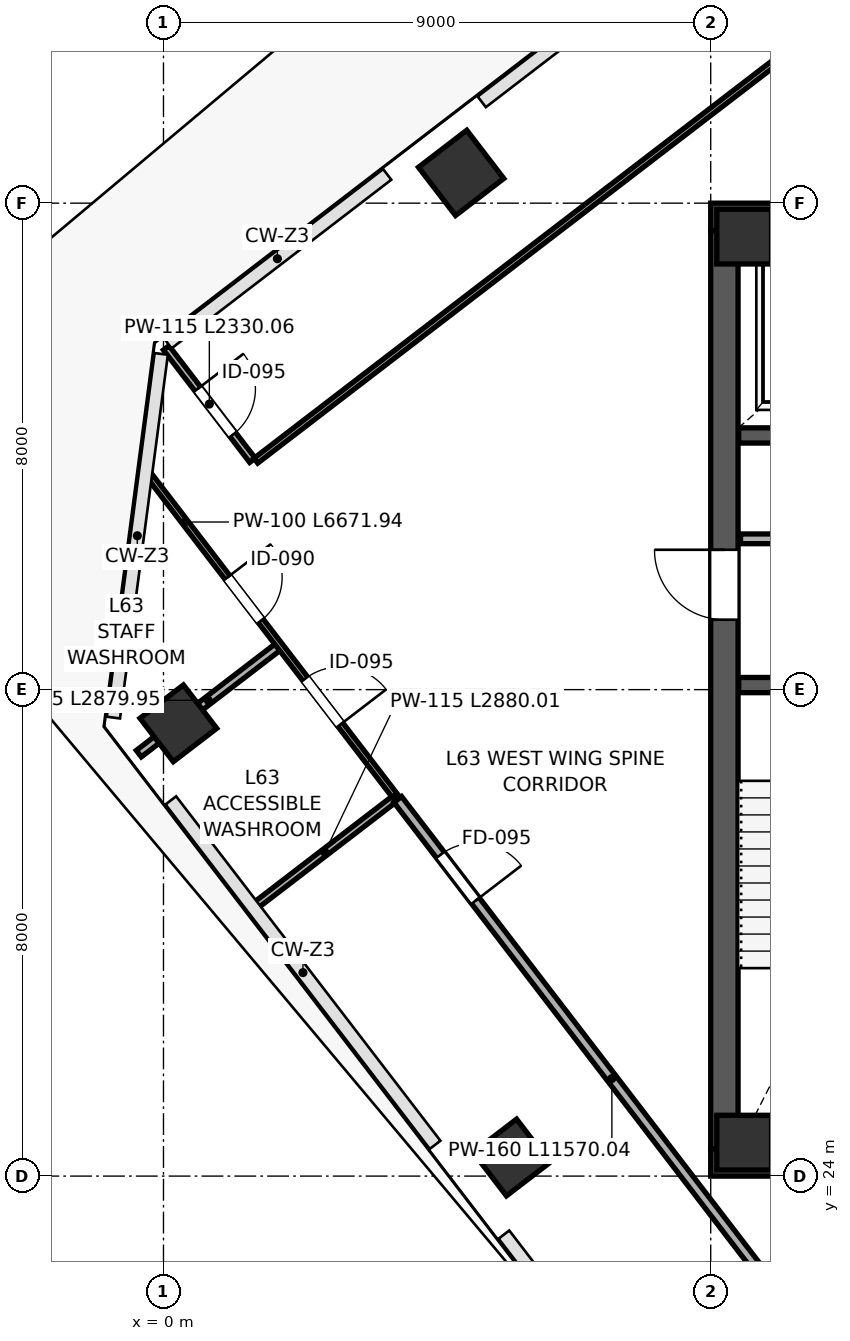
"""IFC4 building model, lengths in metres.
Left out: names, types, materials, properties, quantities, classifications, styles, units other than length and angle.
Written with IfcOpenShell. Run it as: python <this file> out.ifc"""

import sys

from ifc_helpers import new_model, si_unit, direction, frame, frame_2d, origin, origin_2d, place, context, subcontext, project, spatial, rectangle, extrude, source, transform, mapped, element, fill, save


model = new_model("IFC4")
c1 = context("Model", 3, precision=1e-05, world=origin(), true_north=direction((0.0, 1.0)))
c2 = subcontext(c1, "Body", "Model", "MODEL_VIEW")
j1 = project(units=[si_unit("LENGTHUNIT", "METRE"), si_unit("PLANEANGLEUNIT", "RADIAN")], contexts=[c1])
p1 = place(None, origin())
s1 = spatial("IfcSite", under=j1, at=p1, CompositionType="ELEMENT")
p2 = place(p1, origin())
s2 = spatial("IfcBuilding", under=s1, at=p2, CompositionType="ELEMENT")
p3 = place(p2, frame((0.0, 0.0, 279.4)))
s3 = spatial("IfcBuildingStorey", under=s2, at=p3, CompositionType="ELEMENT", Elevation=279.4)
m1 = source(origin(), c2, "Body", "SweptSolid", [
    extrude(rectangle(XDim=0.9, YDim=0.9, at=origin_2d()), origin(), (0.0, 0.0, 1.0), 4.199),
])
for number, where, z_axis, x_axis in (
    (1, (9.55, 24.55, 0.001), (0.0, 0.0, 1.0), (1.0, 0.0, 0.0)),
    (2, (9.55, 39.45, 0.001), (0.0, 0.0, 1.0), (1.0, 0.0, 0.0)),
):
    element("IfcColumn", number, at=place(p3, frame(where, z_axis=z_axis, x_axis=x_axis)), inside=s3, PredefinedType="COLUMN", context=c2, shape_type="MappedRepresentation", body=[
        mapped(m1, transform((0.0, 0.0, 0.0), scale=1.0)),
    ])
m2 = source(origin(), c2, "Body", "SweptSolid", [
    extrude(rectangle(XDim=0.9, YDim=0.9, at=origin_2d()), origin(), (0.0, 0.0, 1.0), 4.199),
])
for number, where, z_axis, x_axis in (
    (3, (0.245, 31.446, 0.001), (0.0, 0.0, 1.0), (-0.609, 0.793, 0.0)),
    (4, (5.724, 24.306, 0.001), (0.0, 0.0, 1.0), (-0.609, 0.793, 0.0)),
):
    element("IfcColumn", number, at=place(p3, frame(where, z_axis=z_axis, x_axis=x_axis)), inside=s3, PredefinedType="COLUMN", context=c2, shape_type="MappedRepresentation", body=[
        mapped(m2, transform((0.0, 0.0, 0.0), scale=1.0)),
    ])
m3 = source(origin(), c2, "Body", "SweptSolid", [
    extrude(rectangle(XDim=1.0, YDim=1.0, at=origin_2d()), origin(), (0.0, 0.0, 1.0), 4.199),
])
p4 = place(p3, frame((4.896, 40.498, 0.001), z_axis=(0.0, 0.0, 1.0), x_axis=(-0.608761429009, 0.793353340291, 0.0)))
e5 = element("IfcColumn", 5, at=p4, inside=s3, PredefinedType="COLUMN", context=c2, shape_type="MappedRepresentation", body=[
    mapped(m3, transform((0.0, 0.0, 0.0), scale=1.0)),
])
p5 = place(p3, frame((9.225, 24.45, 0.0), z_axis=(0.0, 0.0, 1.0), x_axis=(0.0, 1.0, 0.0)))
e6 = element("IfcWall", 6, at=p5, inside=s3, PredefinedType="SHEAR", context=c2, shape_type="SweptSolid", body=[
    extrude(rectangle(XDim=15.1, YDim=0.45, at=frame_2d((7.55, 0.0))), origin(), (0.0, 0.0, 1.0), 3.96),
])
p6 = place(p5, frame((8.7, 0.0, 0.0)))
e7 = element("IfcOpeningElement", 7, at=p6, cuts=e6, PredefinedType="OPENING", context=c2, shape_type="SweptSolid", body=[
    extrude(rectangle(XDim=1.15, YDim=2.2, at=frame_2d((0.575, 1.1))), frame((0.0, 0.235, 0.0), z_axis=(0.0, -1.0, 0.0), x_axis=(1.0, 0.0, 0.0)), (0.0, 0.0, 1.0), 0.47),
])
for number, where, z_axis, x_axis in (
    (8, (9.0, 24.225, 0.0), (0.0, 0.0, 1.0), (1.0, 0.0, 0.0)),
    (9, (9.0, 39.775, 0.0), (0.0, 0.0, 1.0), (1.0, 0.0, 0.0)),
):
    element("IfcWall", number, at=place(p3, frame(where, z_axis=z_axis, x_axis=x_axis)), inside=s3, PredefinedType="SHEAR", context=c2, shape_type="SweptSolid", body=[
        extrude(rectangle(XDim=18.0, YDim=0.45, at=frame_2d((9.0, 0.0))), origin(), (0.0, 0.0, 1.0), 3.96),
    ])
p7 = place(p3, frame((9.46, 32.075, 0.0), z_axis=(0.0, 0.0, 1.0), x_axis=(1.0, 0.0, 0.0)))
e10 = element("IfcWall", 10, at=p7, inside=s3, PredefinedType="SHEAR", context=c2, shape_type="SweptSolid", body=[
    extrude(rectangle(XDim=3.29, YDim=0.25, at=frame_2d((1.645, 0.0))), origin(), (0.0, 0.0, 1.0), 3.96),
])
p8 = place(p3, frame((9.46, 36.18, 0.0), z_axis=(0.0, 0.0, 1.0), x_axis=(1.0, 0.0, 0.0)))
e11 = element("IfcWall", 11, at=p8, inside=s3, PredefinedType="SHEAR", context=c2, shape_type="SweptSolid", body=[
    extrude(rectangle(XDim=3.79, YDim=0.25, at=frame_2d((1.895, 0.0))), origin(), (0.0, 0.0, 1.0), 3.96),
])
p9 = place(p8, frame((2.62, 0.0, 0.0)))
e12 = element("IfcOpeningElement", 12, at=p9, cuts=e11, PredefinedType="OPENING", context=c2, shape_type="SweptSolid", body=[
    extrude(rectangle(XDim=0.85, YDim=2.1, at=frame_2d((0.425, 1.05))), frame((0.0, 0.135, 0.0), z_axis=(0.0, -1.0, 0.0), x_axis=(1.0, 0.0, 0.0)), (0.0, 0.0, 1.0), 0.27),
])
p10 = place(p8, frame((0.85, 0.0, 0.0)))
e13 = element("IfcOpeningElement", 13, at=p10, cuts=e11, PredefinedType="OPENING", context=c2, shape_type="SweptSolid", body=[
    extrude(rectangle(XDim=1.3, YDim=2.25, at=frame_2d((0.65, 1.125))), frame((0.0, 0.135, 0.0), z_axis=(0.0, -1.0, 0.0), x_axis=(1.0, 0.0, 0.0)), (0.0, 0.0, 1.0), 0.27),
])
p11 = place(p3, frame((9.49, 34.48, 0.0), z_axis=(0.0, 0.0, 1.0), x_axis=(1.0, 0.0, 0.0)))
e14 = element("IfcWall", 14, at=p11, inside=s3, PredefinedType="PARTITIONING", context=c2, shape_type="SweptSolid", body=[
    extrude(rectangle(XDim=3.7, YDim=0.16, at=frame_2d((1.85, 0.0))), origin(), (0.0, 0.0, 1.0), 3.96),
])
p12 = place(p11, frame((1.15, 0.0, 0.0)))
e15 = element("IfcOpeningElement", 15, at=p12, cuts=e14, PredefinedType="OPENING", context=c2, shape_type="SweptSolid", body=[
    extrude(rectangle(XDim=0.9, YDim=2.15, at=frame_2d((0.45, 1.075))), frame((0.0, 0.09, 0.0), z_axis=(0.0, -1.0, 0.0), x_axis=(1.0, 0.0, 0.0)), (0.0, 0.0, 1.0), 0.18),
])
p13 = place(p3, frame((-0.406, 30.947, 0.0), z_axis=(0.0, 0.0, 1.0), x_axis=(0.793370260172, 0.608739377956, 0.0)))
e16 = element("IfcWall", 16, at=p13, inside=s3, PredefinedType="PARTITIONING", context=c2, shape_type="SweptSolid", body=[
    extrude(rectangle(XDim=2.88, YDim=0.135, at=frame_2d((1.44, 0.0))), origin(), (0.0, 0.0, 1.0), 3.195),
])
p14 = place(p3, frame((1.512, 28.448, 0.0), z_axis=(0.0, 0.0, 1.0), x_axis=(0.793370260172, 0.608739377956, 0.0)))
e17 = element("IfcWall", 17, at=p14, inside=s3, PredefinedType="PARTITIONING", context=c2, shape_type="SweptSolid", body=[
    extrude(rectangle(XDim=2.88, YDim=0.115, at=frame_2d((1.44, 0.0))), origin(), (0.0, 0.0, 1.0), 3.195),
])
p15 = place(p3, frame((-0.258, 35.551, 0.0), z_axis=(0.0, 0.0, 1.0), x_axis=(0.608751837986, -0.79336069965, 0.0)))
e18 = element("IfcWall", 18, at=p15, inside=s3, PredefinedType="PARTITIONING", context=c2, shape_type="SweptSolid", body=[
    extrude(rectangle(XDim=6.672, YDim=0.1, at=frame_2d((3.336, 0.0))), origin(), (0.0, 0.0, 1.0), 3.96),
])
p16 = place(p15, frame((2.15, 0.0, 0.0)))
e19 = element("IfcOpeningElement", 19, at=p16, cuts=e18, PredefinedType="OPENING", context=c2, shape_type="SweptSolid", body=[
    extrude(rectangle(XDim=0.9, YDim=2.15, at=frame_2d((0.45, 1.075))), frame((0.0, 0.06, 0.0), z_axis=(0.0, -1.0, 0.0), x_axis=(1.0, 0.0, 0.0)), (0.0, 0.0, 1.0), 0.12),
])
p17 = place(p15, frame((4.25, 0.0, 0.0)))
e20 = element("IfcOpeningElement", 20, at=p17, cuts=e18, PredefinedType="OPENING", context=c2, shape_type="SweptSolid", body=[
    extrude(rectangle(XDim=0.95, YDim=2.15, at=frame_2d((0.475, 1.075))), frame((0.0, 0.06, 0.0), z_axis=(0.0, -1.0, 0.0), x_axis=(1.0, 0.0, 0.0)), (0.0, 0.0, 1.0), 0.12),
])
p18 = place(p3, frame((3.853, 30.194, 0.0), z_axis=(0.0, 0.0, 1.0), x_axis=(0.608748677634, -0.793363124603, 0.0)))
e21 = element("IfcWall", 21, at=p18, inside=s3, PredefinedType="PARTITIONING", context=c2, shape_type="SweptSolid", body=[
    extrude(rectangle(XDim=11.57, YDim=0.16, at=frame_2d((5.785, 0.0))), origin(), (0.0, 0.0, 1.0), 3.96),
])
p19 = place(p18, frame((1.15, 0.0, 0.0)))
e22 = element("IfcOpeningElement", 22, at=p19, cuts=e21, PredefinedType="OPENING", context=c2, shape_type="SweptSolid", body=[
    extrude(rectangle(XDim=0.95, YDim=2.15, at=frame_2d((0.475, 1.075))), frame((0.0, 0.09, 0.0), z_axis=(0.0, -1.0, 0.0), x_axis=(1.0, 0.0, 0.0)), (0.0, 0.0, 1.0), 0.18),
])
p20 = place(p3, frame((0.045, 37.62, 0.0), z_axis=(0.0, 0.0, 1.0), x_axis=(0.60874824263, -0.793363458381, 0.0)))
e23 = element("IfcWall", 23, at=p20, inside=s3, PredefinedType="PARTITIONING", context=c2, shape_type="SweptSolid", body=[
    extrude(rectangle(XDim=2.33, YDim=0.115, at=frame_2d((1.165, 0.0))), origin(), (0.0, 0.0, 1.0), 3.96),
])
p21 = place(p20, frame((0.85, 0.0, 0.0)))
e24 = element("IfcOpeningElement", 24, at=p21, cuts=e23, PredefinedType="OPENING", context=c2, shape_type="SweptSolid", body=[
    extrude(rectangle(XDim=0.95, YDim=2.15, at=frame_2d((0.475, 1.075))), frame((0.0, 0.067, 0.0), z_axis=(0.0, -1.0, 0.0), x_axis=(1.0, 0.0, 0.0)), (0.0, 0.0, 1.0), 0.135),
])
p22 = place(p3, frame((1.519, 35.764, 0.0), z_axis=(0.0, 0.0, 1.0), x_axis=(0.793353184068, 0.608761632602, 0.0)))
e25 = element("IfcWall", 25, at=p22, inside=s3, PredefinedType="PARTITIONING", context=c2, shape_type="SweptSolid", body=[
    extrude(rectangle(XDim=27.572, YDim=0.1, at=frame_2d((13.786, 0.0))), origin(), (0.0, 0.0, 1.0), 3.96),
])
m4 = source(origin(), c2, "Body", "SweptSolid", [
    extrude(rectangle(XDim=1.15, YDim=2.2, at=frame_2d((0.575, 1.1))), frame((0.0, 0.025, 0.0), z_axis=(0.0, -1.0, 0.0), x_axis=(1.0, 0.0, 0.0)), (0.0, 0.0, 1.0), 0.05),
])
p23 = place(p6, origin())
e26 = element("IfcDoor", 26, at=p23, inside=s3, OperationType="SINGLE_SWING_RIGHT", PredefinedType="DOOR", context=c2, shape_type="MappedRepresentation", body=[
    mapped(m4, transform((0.0, 0.0, 0.0), scale=1.0)),
])
fill(e7, e26)
m5 = source(origin(), c2, "Body", "SweptSolid", [
    extrude(rectangle(XDim=0.9, YDim=2.15, at=frame_2d((0.45, 1.075))), frame((0.0, 0.025, 0.0), z_axis=(0.0, -1.0, 0.0), x_axis=(1.0, 0.0, 0.0)), (0.0, 0.0, 1.0), 0.05),
])
p24 = place(p16, origin())
e27 = element("IfcDoor", 27, at=p24, inside=s3, OperationType="SINGLE_SWING_LEFT", PredefinedType="DOOR", context=c2, shape_type="MappedRepresentation", body=[
    mapped(m5, transform((0.0, 0.0, 0.0), scale=1.0)),
])
fill(e19, e27)
m6 = source(origin(), c2, "Body", "SweptSolid", [
    extrude(rectangle(XDim=0.95, YDim=2.15, at=frame_2d((0.475, 1.075))), frame((0.0, 0.025, 0.0), z_axis=(0.0, -1.0, 0.0), x_axis=(1.0, 0.0, 0.0)), (0.0, 0.0, 1.0), 0.05),
])
p25 = place(p17, origin())
e28 = element("IfcDoor", 28, at=p25, inside=s3, OperationType="SINGLE_SWING_RIGHT", PredefinedType="DOOR", context=c2, shape_type="MappedRepresentation", body=[
    mapped(m6, transform((0.0, 0.0, 0.0), scale=1.0)),
])
fill(e20, e28)
m7 = source(origin(), c2, "Body", "SweptSolid", [
    extrude(rectangle(XDim=0.95, YDim=2.15, at=frame_2d((0.475, 1.075))), frame((0.0, 0.025, 0.0), z_axis=(0.0, -1.0, 0.0), x_axis=(1.0, 0.0, 0.0)), (0.0, 0.0, 1.0), 0.05),
])
p26 = place(p19, origin())
e29 = element("IfcDoor", 29, at=p26, inside=s3, OperationType="SINGLE_SWING_RIGHT", PredefinedType="DOOR", context=c2, shape_type="MappedRepresentation", body=[
    mapped(m7, transform((0.0, 0.0, 0.0), scale=1.0)),
])
fill(e22, e29)
p27 = place(p21, origin())
e30 = element("IfcDoor", 30, at=p27, inside=s3, OperationType="SINGLE_SWING_LEFT", PredefinedType="DOOR", context=c2, shape_type="MappedRepresentation", body=[
    mapped(m6, transform((0.0, 0.0, 0.0), scale=1.0)),
])
fill(e24, e30)
save(model, sys.argv[1])
